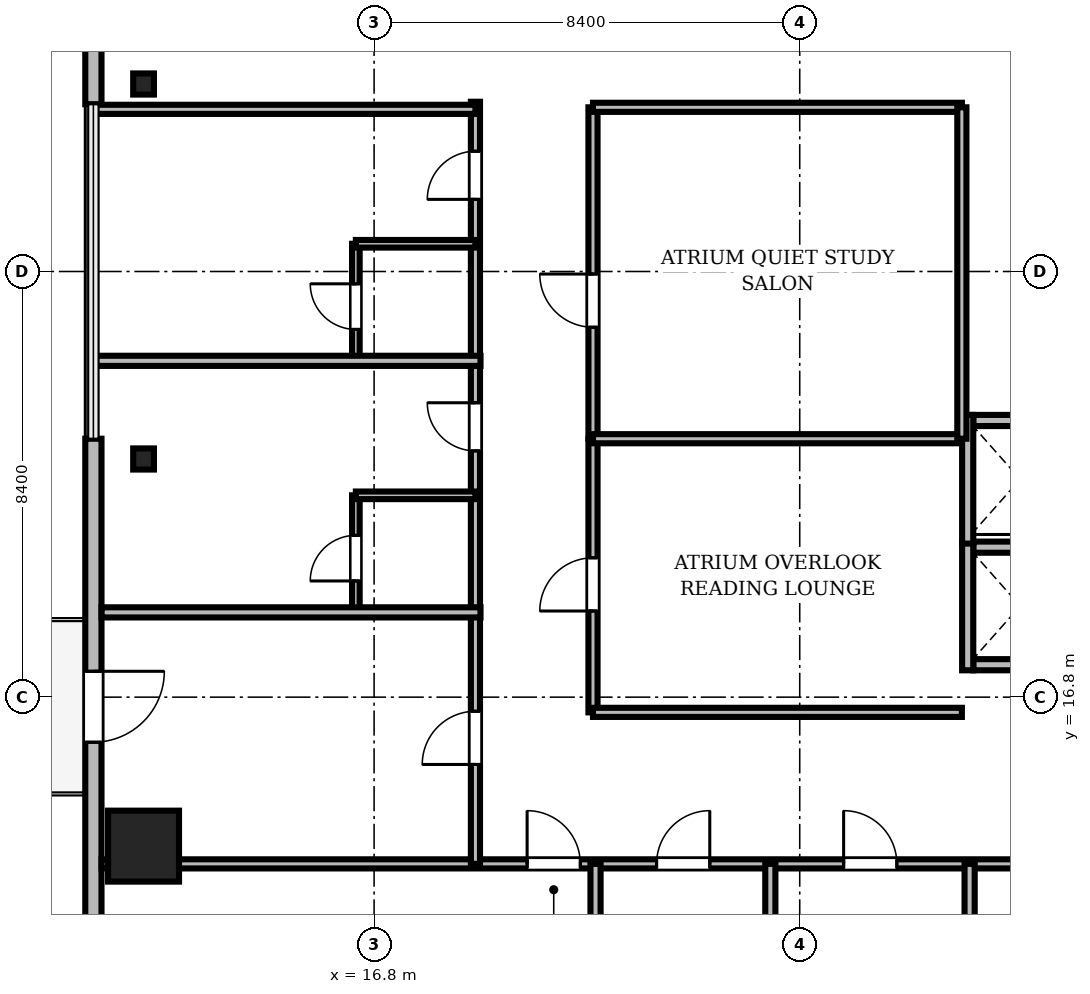
"""IFC4 building model, lengths in metres.
Left out: names, types, materials, properties, quantities, classifications, styles, units other than length and angle.
Written with IfcOpenShell. Run it as: python <this file> out.ifc"""

import sys

from ifc_helpers import new_model, si_unit, direction, frame, frame_2d, origin, origin_2d, place, context, subcontext, project, spatial, rectangle, i_section, extrude, source, transform, mapped, element, fill, save


model = new_model("IFC4")
c1 = context("Model", 3, precision=1e-05, world=origin(), true_north=direction((0.0, 1.0)))
c2 = subcontext(c1, "Body", "Model", "MODEL_VIEW")
j1 = project(units=[si_unit("LENGTHUNIT", "METRE"), si_unit("PLANEANGLEUNIT", "RADIAN")], contexts=[c1])
p1 = place(None, origin())
s1 = spatial("IfcSite", under=j1, at=p1, CompositionType="ELEMENT")
p2 = place(p1, origin())
s2 = spatial("IfcBuilding", under=s1, at=p2, CompositionType="ELEMENT")
p3 = place(p2, frame((0.0, 0.0, 214.8)))
s3 = spatial("IfcBuildingStorey", under=s2, at=p3, CompositionType="ELEMENT", Elevation=214.8)
m1 = source(origin(), c2, "Body", "SweptSolid", [
    extrude(rectangle(XDim=1.4, YDim=1.4, at=origin_2d()), origin(), (0.0, 0.0, 1.0), 3.53),
])
p4 = place(p3, frame((12.25, 13.86, 0.0), z_axis=(0.0, 0.0, 1.0), x_axis=(1.0, 0.0, 0.0)))
e1 = element("IfcColumn", 1, at=p4, inside=s3, PredefinedType="COLUMN", context=c2, shape_type="MappedRepresentation", body=[
    mapped(m1, transform((0.0, 0.0, 0.0), scale=1.0)),
])
m2 = source(origin(), c2, "Body", "SweptSolid", [
    extrude(i_section(OverallWidth=0.409, OverallDepth=0.417, WebThickness=0.021, FlangeThickness=0.033, FilletRadius=0.015, at=origin_2d()), origin(), (0.0, 0.0, 1.0), 3.53),
])
for number, where, z_axis, x_axis in (
    (2, (12.25, 28.9, 0.0), (0.0, 0.0, 1.0), (1.0, 0.0, 0.0)),
    (3, (12.25, 21.5, 0.0), (0.0, 0.0, 1.0), (1.0, 0.0, 0.0)),
):
    element("IfcColumn", number, at=place(p3, frame(where, z_axis=z_axis, x_axis=x_axis)), inside=s3, PredefinedType="COLUMN", context=c2, shape_type="MappedRepresentation", body=[
        mapped(m2, transform((0.0, 0.0, 0.0), scale=1.0)),
    ])
m3 = source(origin(), c2, "Body", "SweptSolid", [
    extrude(rectangle(XDim=15.6, YDim=0.32, at=frame_2d((7.8, 0.0))), origin(), (0.0, 0.0, 1.0), 3.53),
])
p5 = place(p3, frame((11.26, 44.1, 0.0), z_axis=(0.0, 0.0, 1.0), x_axis=(0.0, -1.0, 0.0)))
e4 = element("IfcWall", 4, at=p5, inside=s3, PredefinedType="SOLIDWALL", context=c2, shape_type="MappedRepresentation", body=[
    mapped(m3, transform((0.0, 0.0, 0.0), scale=1.0)),
])
m4 = source(origin(), c2, "Body", "SweptSolid", [
    extrude(rectangle(XDim=2.2, YDim=2.4, at=frame_2d((1.1, 1.2))), frame((0.0, 0.17, 0.0), z_axis=(0.0, -1.0, 0.0), x_axis=(1.0, 0.0, 0.0)), (0.0, 0.0, 1.0), 0.34),
])
p6 = place(p5, frame((3.005, 0.0, 0.72)))
e5 = element("IfcOpeningElement", 5, at=p6, cuts=e4, PredefinedType="OPENING", context=c2, shape_type="MappedRepresentation", body=[
    mapped(m4, transform((0.0, 0.0, 0.0), scale=1.0)),
])
m5 = source(origin(), c2, "Body", "SweptSolid", [
    extrude(rectangle(XDim=15.6, YDim=0.32, at=frame_2d((7.8, 0.0))), origin(), (0.0, 0.0, 1.0), 3.53),
])
p7 = place(p3, frame((11.26, 21.9, 0.0), z_axis=(0.0, 0.0, 1.0), x_axis=(0.0, -1.0, 0.0)))
e6 = element("IfcWall", 6, at=p7, inside=s3, PredefinedType="SOLIDWALL", context=c2, shape_type="MappedRepresentation", body=[
    mapped(m5, transform((0.0, 0.0, 0.0), scale=1.0)),
])
m6 = source(origin(), c2, "Body", "SweptSolid", [
    extrude(rectangle(XDim=1.4, YDim=2.3, at=frame_2d((0.7, 1.15))), frame((0.0, 0.17, 0.0), z_axis=(0.0, -1.0, 0.0), x_axis=(1.0, 0.0, 0.0)), (0.0, 0.0, 1.0), 0.34),
])
p8 = place(p7, frame((4.59, 0.0, 0.0)))
e7 = element("IfcOpeningElement", 7, at=p8, cuts=e6, PredefinedType="OPENING", context=c2, shape_type="MappedRepresentation", body=[
    mapped(m6, transform((0.0, 0.0, 0.0), scale=1.0)),
])
p9 = place(p7, frame((10.395, 0.0, 0.72)))
e8 = element("IfcOpeningElement", 8, at=p9, cuts=e6, PredefinedType="OPENING", context=c2, shape_type="MappedRepresentation", body=[
    mapped(m4, transform((0.0, 0.0, 0.0), scale=1.0)),
])
m7 = source(origin(), c2, "Body", "SweptSolid", [
    extrude(rectangle(XDim=1.85, YDim=0.22, at=frame_2d((0.925, 0.0))), origin(), (0.0, 0.0, 1.0), 2.972),
])
p10 = place(p3, frame((28.625, 17.44, 0.0), z_axis=(0.0, 0.0, 1.0), x_axis=(1.0, 0.0, 0.0)))
e9 = element("IfcWall", 9, at=p10, inside=s3, PredefinedType="SOLIDWALL", context=c2, shape_type="MappedRepresentation", body=[
    mapped(m7, transform((0.0, 0.0, 0.0), scale=1.0)),
])
m8 = source(origin(), c2, "Body", "SweptSolid", [
    extrude(rectangle(XDim=1.85, YDim=0.22, at=frame_2d((0.925, 0.0))), origin(), (0.0, 0.0, 1.0), 3.53),
])
p11 = place(p3, frame((28.625, 19.76, 0.0), z_axis=(0.0, 0.0, 1.0), x_axis=(1.0, 0.0, 0.0)))
e10 = element("IfcWall", 10, at=p11, inside=s3, PredefinedType="SOLIDWALL", context=c2, shape_type="MappedRepresentation", body=[
    mapped(m8, transform((0.0, 0.0, 0.0), scale=1.0)),
])
m9 = source(origin(), c2, "Body", "SweptSolid", [
    extrude(rectangle(XDim=2.54, YDim=0.22, at=frame_2d((1.27, 0.0))), origin(), (0.0, 0.0, 1.0), 2.972),
])
p12 = place(p3, frame((28.515, 17.33, 0.0), z_axis=(0.0, 0.0, 1.0), x_axis=(0.0, 1.0, 0.0)))
e11 = element("IfcWall", 11, at=p12, inside=s3, PredefinedType="SOLIDWALL", context=c2, shape_type="MappedRepresentation", body=[
    mapped(m9, transform((0.0, 0.0, 0.0), scale=1.0)),
])
p13 = place(p3, frame((28.625, 22.26, 0.0), z_axis=(0.0, 0.0, 1.0), x_axis=(1.0, 0.0, 0.0)))
e12 = element("IfcWall", 12, at=p13, inside=s3, PredefinedType="SOLIDWALL", context=c2, shape_type="MappedRepresentation", body=[
    mapped(m8, transform((0.0, 0.0, 0.0), scale=1.0)),
])
m10 = source(origin(), c2, "Body", "SweptSolid", [
    extrude(rectangle(XDim=2.54, YDim=0.22, at=frame_2d((1.27, 0.0))), origin(), (0.0, 0.0, 1.0), 3.53),
])
p14 = place(p3, frame((28.515, 19.83, 0.0), z_axis=(0.0, 0.0, 1.0), x_axis=(0.0, 1.0, 0.0)))
e13 = element("IfcWall", 13, at=p14, inside=s3, PredefinedType="SOLIDWALL", context=c2, shape_type="MappedRepresentation", body=[
    mapped(m10, transform((0.0, 0.0, 0.0), scale=1.0)),
])
m11 = source(origin(), c2, "Body", "SweptSolid", [
    extrude(rectangle(XDim=46.156, YDim=0.18, at=frame_2d((23.078, 0.0))), origin(), (0.0, 0.0, 1.0), 2.772),
])
p15 = place(p3, frame((11.422, 13.51, 0.0), z_axis=(0.0, 0.0, 1.0), x_axis=(1.0, 0.0, 0.0)))
e14 = element("IfcWall", 14, at=p15, inside=s3, PredefinedType="PARTITIONING", context=c2, shape_type="MappedRepresentation", body=[
    mapped(m11, transform((0.0, 0.0, 0.0), scale=1.0)),
])
m12 = source(origin(), c2, "Body", "SweptSolid", [
    extrude(rectangle(XDim=1.05, YDim=2.2, at=frame_2d((0.525, 1.1))), frame((0.0, 0.1, 0.0), z_axis=(0.0, -1.0, 0.0), x_axis=(1.0, 0.0, 0.0)), (0.0, 0.0, 1.0), 0.2),
])
p16 = place(p15, frame((8.398, 0.0, 0.0)))
e15 = element("IfcOpeningElement", 15, at=p16, cuts=e14, PredefinedType="OPENING", context=c2, shape_type="MappedRepresentation", body=[
    mapped(m12, transform((0.0, 0.0, 0.0), scale=1.0)),
])
p17 = place(p15, frame((10.953, 0.0, 0.0)))
e16 = element("IfcOpeningElement", 16, at=p17, cuts=e14, PredefinedType="OPENING", context=c2, shape_type="MappedRepresentation", body=[
    mapped(m12, transform((0.0, 0.0, 0.0), scale=1.0)),
])
p18 = place(p15, frame((14.645, 0.0, 0.0)))
e17 = element("IfcOpeningElement", 17, at=p18, cuts=e14, PredefinedType="OPENING", context=c2, shape_type="MappedRepresentation", body=[
    mapped(m12, transform((0.0, 0.0, 0.0), scale=1.0)),
])
m13 = source(origin(), c2, "Body", "SweptSolid", [
    extrude(rectangle(XDim=0.95, YDim=2.15, at=frame_2d((0.475, 1.075))), frame((0.0, 0.1, 0.0), z_axis=(0.0, -1.0, 0.0), x_axis=(1.0, 0.0, 0.0)), (0.0, 0.0, 1.0), 0.2),
])
p19 = place(p15, frame((20.057, 0.0, 0.0)))
e18 = element("IfcOpeningElement", 18, at=p19, cuts=e14, PredefinedType="OPENING", context=c2, shape_type="MappedRepresentation", body=[
    mapped(m13, transform((0.0, 0.0, 0.0), scale=1.0)),
])
p20 = place(p15, frame((23.274, 0.0, 0.0)))
e19 = element("IfcOpeningElement", 19, at=p20, cuts=e14, PredefinedType="OPENING", context=c2, shape_type="MappedRepresentation", body=[
    mapped(m12, transform((0.0, 0.0, 0.0), scale=1.0)),
])
p21 = place(p15, frame((27.716, 0.0, 0.0)))
e20 = element("IfcOpeningElement", 20, at=p21, cuts=e14, PredefinedType="OPENING", context=c2, shape_type="MappedRepresentation", body=[
    mapped(m12, transform((0.0, 0.0, 0.0), scale=1.0)),
])
p22 = place(p15, frame((32.907, 0.0, 0.0)))
e21 = element("IfcOpeningElement", 21, at=p22, cuts=e14, PredefinedType="OPENING", context=c2, shape_type="MappedRepresentation", body=[
    mapped(m12, transform((0.0, 0.0, 0.0), scale=1.0)),
])
p23 = place(p15, frame((37.498, 0.0, 0.0)))
e22 = element("IfcOpeningElement", 22, at=p23, cuts=e14, PredefinedType="OPENING", context=c2, shape_type="MappedRepresentation", body=[
    mapped(m12, transform((0.0, 0.0, 0.0), scale=1.0)),
])
m14 = source(origin(), c2, "Body", "SweptSolid", [
    extrude(rectangle(XDim=15.04, YDim=0.18, at=frame_2d((7.52, 0.0))), origin(), (0.0, 0.0, 1.0), 2.972),
])
p24 = place(p3, frame((18.8, 13.51, 0.0), z_axis=(0.0, 0.0, 1.0), x_axis=(0.0, 1.0, 0.0)))
e23 = element("IfcWall", 23, at=p24, inside=s3, PredefinedType="PARTITIONING", context=c2, shape_type="MappedRepresentation", body=[
    mapped(m14, transform((0.0, 0.0, 0.0), scale=1.0)),
])
p25 = place(p24, frame((1.962, 0.0, 0.0)))
e24 = element("IfcOpeningElement", 24, at=p25, cuts=e23, PredefinedType="OPENING", context=c2, shape_type="MappedRepresentation", body=[
    mapped(m12, transform((0.0, 0.0, 0.0), scale=1.0)),
])
p26 = place(p24, frame((8.15, 0.0, 0.0)))
e25 = element("IfcOpeningElement", 25, at=p26, cuts=e23, PredefinedType="OPENING", context=c2, shape_type="MappedRepresentation", body=[
    mapped(m13, transform((0.0, 0.0, 0.0), scale=1.0)),
])
p27 = place(p24, frame((13.113, 0.0, 0.0)))
e26 = element("IfcOpeningElement", 26, at=p27, cuts=e23, PredefinedType="OPENING", context=c2, shape_type="MappedRepresentation", body=[
    mapped(m13, transform((0.0, 0.0, 0.0), scale=1.0)),
])
m15 = source(origin(), c2, "Body", "SweptSolid", [
    extrude(rectangle(XDim=6.54, YDim=0.18, at=frame_2d((3.27, 0.0))), origin(), (0.0, 0.0, 1.0), 2.972),
])
p28 = place(p3, frame((21.12, 21.9, 0.0), z_axis=(0.0, 0.0, 1.0), x_axis=(0.0, 1.0, 0.0)))
e27 = element("IfcWall", 27, at=p28, inside=s3, PredefinedType="PARTITIONING", context=c2, shape_type="MappedRepresentation", body=[
    mapped(m15, transform((0.0, 0.0, 0.0), scale=1.0)),
])
p29 = place(p28, frame((2.2, 0.0, 0.0)))
e28 = element("IfcOpeningElement", 28, at=p29, cuts=e27, PredefinedType="OPENING", context=c2, shape_type="MappedRepresentation", body=[
    mapped(m12, transform((0.0, 0.0, 0.0), scale=1.0)),
])
m16 = source(origin(), c2, "Body", "SweptSolid", [
    extrude(rectangle(XDim=5.4, YDim=0.18, at=frame_2d((2.7, 0.0))), origin(), (0.0, 0.0, 1.0), 2.972),
])
p30 = place(p3, frame((21.12, 16.5, 0.0), z_axis=(0.0, 0.0, 1.0), x_axis=(0.0, 1.0, 0.0)))
e29 = element("IfcWall", 29, at=p30, inside=s3, PredefinedType="PARTITIONING", context=c2, shape_type="MappedRepresentation", body=[
    mapped(m16, transform((0.0, 0.0, 0.0), scale=1.0)),
])
p31 = place(p30, frame((2.0, 0.0, 0.0)))
e30 = element("IfcOpeningElement", 30, at=p31, cuts=e29, PredefinedType="OPENING", context=c2, shape_type="MappedRepresentation", body=[
    mapped(m12, transform((0.0, 0.0, 0.0), scale=1.0)),
])
m17 = source(origin(), c2, "Body", "SweptSolid", [
    extrude(rectangle(XDim=2.29, YDim=0.15, at=frame_2d((1.145, 0.0))), origin(), (0.0, 0.0, 1.0), 2.972),
])
p32 = place(p3, frame((16.44, 18.493, 0.0), z_axis=(0.0, 0.0, 1.0), x_axis=(0.0, 1.0, 0.0)))
e31 = element("IfcWall", 31, at=p32, inside=s3, PredefinedType="PARTITIONING", context=c2, shape_type="MappedRepresentation", body=[
    mapped(m17, transform((0.0, 0.0, 0.0), scale=1.0)),
])
m18 = source(origin(), c2, "Body", "SweptSolid", [
    extrude(rectangle(XDim=0.9, YDim=2.1, at=frame_2d((0.45, 1.05))), frame((0.0, 0.085, 0.0), z_axis=(0.0, -1.0, 0.0), x_axis=(1.0, 0.0, 0.0)), (0.0, 0.0, 1.0), 0.17),
])
p33 = place(p32, frame((0.6, 0.0, 0.0)))
e32 = element("IfcOpeningElement", 32, at=p33, cuts=e31, PredefinedType="OPENING", context=c2, shape_type="MappedRepresentation", body=[
    mapped(m18, transform((0.0, 0.0, 0.0), scale=1.0)),
])
m19 = source(origin(), c2, "Body", "SweptSolid", [
    extrude(rectangle(XDim=2.29, YDim=0.15, at=frame_2d((1.145, 0.0))), origin(), (0.0, 0.0, 1.0), 3.222),
])
p34 = place(p3, frame((16.44, 23.457, 0.0), z_axis=(0.0, 0.0, 1.0), x_axis=(0.0, 1.0, 0.0)))
e33 = element("IfcWall", 33, at=p34, inside=s3, PredefinedType="PARTITIONING", context=c2, shape_type="MappedRepresentation", body=[
    mapped(m19, transform((0.0, 0.0, 0.0), scale=1.0)),
])
p35 = place(p34, frame((0.6, 0.0, 0.0)))
e34 = element("IfcOpeningElement", 34, at=p35, cuts=e33, PredefinedType="OPENING", context=c2, shape_type="MappedRepresentation", body=[
    mapped(m18, transform((0.0, 0.0, 0.0), scale=1.0)),
])
m20 = source(origin(), c2, "Body", "SweptSolid", [
    extrude(rectangle(XDim=11.388, YDim=0.2, at=frame_2d((5.694, 0.0))), origin(), (0.0, 0.0, 1.0), 2.772),
])
for number, where, z_axis, x_axis in (
    (35, (21.17, 2.122, 0.0), (0.0, 0.0, 1.0), (0.0, 1.0, 0.0)),
    (36, (24.62, 2.122, 0.0), (0.0, 0.0, 1.0), (0.0, 1.0, 0.0)),
    (37, (28.553, 2.122, 0.0), (0.0, 0.0, 1.0), (0.0, 1.0, 0.0)),
):
    element("IfcWall", number, at=place(p3, frame(where, z_axis=z_axis, x_axis=x_axis)), inside=s3, PredefinedType="PARTITIONING", context=c2, shape_type="MappedRepresentation", body=[
        mapped(m20, transform((0.0, 0.0, 0.0), scale=1.0)),
    ])
m21 = source(origin(), c2, "Body", "SweptSolid", [
    extrude(rectangle(XDim=7.478, YDim=0.2, at=frame_2d((3.739, 0.0))), origin(), (0.0, 0.0, 1.0), 2.772),
])
p36 = place(p3, frame((11.422, 18.473, 0.0), z_axis=(0.0, 0.0, 1.0), x_axis=(1.0, 0.0, 0.0)))
e38 = element("IfcWall", 38, at=p36, inside=s3, PredefinedType="PARTITIONING", context=c2, shape_type="MappedRepresentation", body=[
    mapped(m21, transform((0.0, 0.0, 0.0), scale=1.0)),
])
m22 = source(origin(), c2, "Body", "SweptSolid", [
    extrude(rectangle(XDim=7.67, YDim=0.2, at=frame_2d((3.835, 0.0))), origin(), (0.0, 0.0, 1.0), 2.772),
])
p37 = place(p3, frame((11.23, 23.437, 0.0), z_axis=(0.0, 0.0, 1.0), x_axis=(1.0, 0.0, 0.0)))
e39 = element("IfcWall", 39, at=p37, inside=s3, PredefinedType="PARTITIONING", context=c2, shape_type="MappedRepresentation", body=[
    mapped(m22, transform((0.0, 0.0, 0.0), scale=1.0)),
])
m23 = source(origin(), c2, "Body", "SweptSolid", [
    extrude(rectangle(XDim=7.57, YDim=0.18, at=frame_2d((3.785, 0.0))), origin(), (0.0, 0.0, 1.0), 2.772),
])
p38 = place(p3, frame((11.23, 28.4, 0.0), z_axis=(0.0, 0.0, 1.0), x_axis=(1.0, 0.0, 0.0)))
e40 = element("IfcWall", 40, at=p38, inside=s3, PredefinedType="PARTITIONING", context=c2, shape_type="MappedRepresentation", body=[
    mapped(m23, transform((0.0, 0.0, 0.0), scale=1.0)),
])
m24 = source(origin(), c2, "Body", "SweptSolid", [
    extrude(rectangle(XDim=7.28, YDim=0.18, at=frame_2d((3.64, 0.0))), origin(), (0.0, 0.0, 1.0), 3.53),
])
for number, where, z_axis, x_axis in (
    (41, (21.12, 16.5, 0.0), (0.0, 0.0, 1.0), (1.0, 0.0, 0.0)),
    (42, (21.12, 21.9, 0.0), (0.0, 0.0, 1.0), (1.0, 0.0, 0.0)),
    (43, (21.12, 28.44, 0.0), (0.0, 0.0, 1.0), (1.0, 0.0, 0.0)),
):
    element("IfcWall", number, at=place(p3, frame(where, z_axis=z_axis, x_axis=x_axis)), inside=s3, PredefinedType="PARTITIONING", context=c2, shape_type="MappedRepresentation", body=[
        mapped(m24, transform((0.0, 0.0, 0.0), scale=1.0)),
    ])
p39 = place(p3, frame((28.4, 21.9, 0.0), z_axis=(0.0, 0.0, 1.0), x_axis=(0.0, 1.0, 0.0)))
e44 = element("IfcWall", 44, at=p39, inside=s3, PredefinedType="PARTITIONING", context=c2, shape_type="MappedRepresentation", body=[
    mapped(m15, transform((0.0, 0.0, 0.0), scale=1.0)),
])
m25 = source(origin(), c2, "Body", "SweptSolid", [
    extrude(rectangle(XDim=2.36, YDim=0.15, at=frame_2d((1.18, 0.0))), origin(), (0.0, 0.0, 1.0), 3.53),
])
for number, where, z_axis, x_axis in (
    (45, (16.44, 20.783, 0.0), (0.0, 0.0, 1.0), (1.0, 0.0, 0.0)),
    (46, (16.44, 25.747, 0.0), (0.0, 0.0, 1.0), (1.0, 0.0, 0.0)),
):
    element("IfcWall", number, at=place(p3, frame(where, z_axis=z_axis, x_axis=x_axis)), inside=s3, PredefinedType="PARTITIONING", context=c2, shape_type="MappedRepresentation", body=[
        mapped(m25, transform((0.0, 0.0, 0.0), scale=1.0)),
    ])
m26 = source(origin(), c2, "Body", "SweptSolid", [
    extrude(rectangle(XDim=1.4, YDim=2.3, at=frame_2d((0.7, 1.15))), frame((0.0, 0.025, 0.0), z_axis=(0.0, -1.0, 0.0), x_axis=(1.0, 0.0, 0.0)), (0.0, 0.0, 1.0), 0.05),
])
p40 = place(p8, frame((1.4, 0.0, 0.0), z_axis=(0.0, 0.0, 1.0), x_axis=(-1.0, 0.0, 0.0)))
e47 = element("IfcDoor", 47, at=p40, inside=s3, OperationType="DOUBLE_DOOR_SLIDING", PredefinedType="DOOR", context=c2, shape_type="MappedRepresentation", body=[
    mapped(m26, transform((0.0, 0.0, 0.0), scale=1.0)),
])
fill(e7, e47)
m27 = source(origin(), c2, "Body", "SweptSolid", [
    extrude(rectangle(XDim=1.05, YDim=2.2, at=frame_2d((0.525, 1.1))), frame((0.0, 0.025, 0.0), z_axis=(0.0, -1.0, 0.0), x_axis=(1.0, 0.0, 0.0)), (0.0, 0.0, 1.0), 0.05),
])
p41 = place(p16, origin())
e48 = element("IfcDoor", 48, at=p41, inside=s3, OperationType="SINGLE_SWING_LEFT", PredefinedType="DOOR", context=c2, shape_type="MappedRepresentation", body=[
    mapped(m27, transform((0.0, 0.0, 0.0), scale=1.0)),
])
fill(e15, e48)
p42 = place(p17, origin())
e49 = element("IfcDoor", 49, at=p42, inside=s3, OperationType="SINGLE_SWING_RIGHT", PredefinedType="DOOR", context=c2, shape_type="MappedRepresentation", body=[
    mapped(m27, transform((0.0, 0.0, 0.0), scale=1.0)),
])
fill(e16, e49)
p43 = place(p18, origin())
e50 = element("IfcDoor", 50, at=p43, inside=s3, OperationType="SINGLE_SWING_LEFT", PredefinedType="DOOR", context=c2, shape_type="MappedRepresentation", body=[
    mapped(m27, transform((0.0, 0.0, 0.0), scale=1.0)),
])
fill(e17, e50)
p44 = place(p25, origin())
e51 = element("IfcDoor", 51, at=p44, inside=s3, OperationType="SINGLE_SWING_LEFT", PredefinedType="DOOR", context=c2, shape_type="MappedRepresentation", body=[
    mapped(m27, transform((0.0, 0.0, 0.0), scale=1.0)),
])
fill(e24, e51)
m28 = source(origin(), c2, "Body", "SweptSolid", [
    extrude(rectangle(XDim=0.95, YDim=2.15, at=frame_2d((0.475, 1.075))), frame((0.0, 0.025, 0.0), z_axis=(0.0, -1.0, 0.0), x_axis=(1.0, 0.0, 0.0)), (0.0, 0.0, 1.0), 0.05),
])
p45 = place(p26, origin())
e52 = element("IfcDoor", 52, at=p45, inside=s3, OperationType="SINGLE_SWING_RIGHT", PredefinedType="DOOR", context=c2, shape_type="MappedRepresentation", body=[
    mapped(m28, transform((0.0, 0.0, 0.0), scale=1.0)),
])
fill(e25, e52)
p46 = place(p27, origin())
e53 = element("IfcDoor", 53, at=p46, inside=s3, OperationType="SINGLE_SWING_LEFT", PredefinedType="DOOR", context=c2, shape_type="MappedRepresentation", body=[
    mapped(m28, transform((0.0, 0.0, 0.0), scale=1.0)),
])
fill(e26, e53)
p47 = place(p29, origin())
e54 = element("IfcDoor", 54, at=p47, inside=s3, OperationType="SINGLE_SWING_RIGHT", PredefinedType="DOOR", context=c2, shape_type="MappedRepresentation", body=[
    mapped(m27, transform((0.0, 0.0, 0.0), scale=1.0)),
])
fill(e28, e54)
p48 = place(p31, origin())
e55 = element("IfcDoor", 55, at=p48, inside=s3, OperationType="SINGLE_SWING_LEFT", PredefinedType="DOOR", context=c2, shape_type="MappedRepresentation", body=[
    mapped(m27, transform((0.0, 0.0, 0.0), scale=1.0)),
])
fill(e30, e55)
m29 = source(origin(), c2, "Body", "SweptSolid", [
    extrude(rectangle(XDim=0.9, YDim=2.1, at=frame_2d((0.45, 1.05))), frame((0.0, 0.025, 0.0), z_axis=(0.0, -1.0, 0.0), x_axis=(1.0, 0.0, 0.0)), (0.0, 0.0, 1.0), 0.05),
])
p49 = place(p33, origin())
e56 = element("IfcDoor", 56, at=p49, inside=s3, OperationType="SINGLE_SWING_LEFT", PredefinedType="DOOR", context=c2, shape_type="MappedRepresentation", body=[
    mapped(m29, transform((0.0, 0.0, 0.0), scale=1.0)),
])
fill(e32, e56)
p50 = place(p35, origin())
e57 = element("IfcDoor", 57, at=p50, inside=s3, OperationType="SINGLE_SWING_RIGHT", PredefinedType="DOOR", context=c2, shape_type="MappedRepresentation", body=[
    mapped(m29, transform((0.0, 0.0, 0.0), scale=1.0)),
])
fill(e34, e57)
save(model, sys.argv[1])
